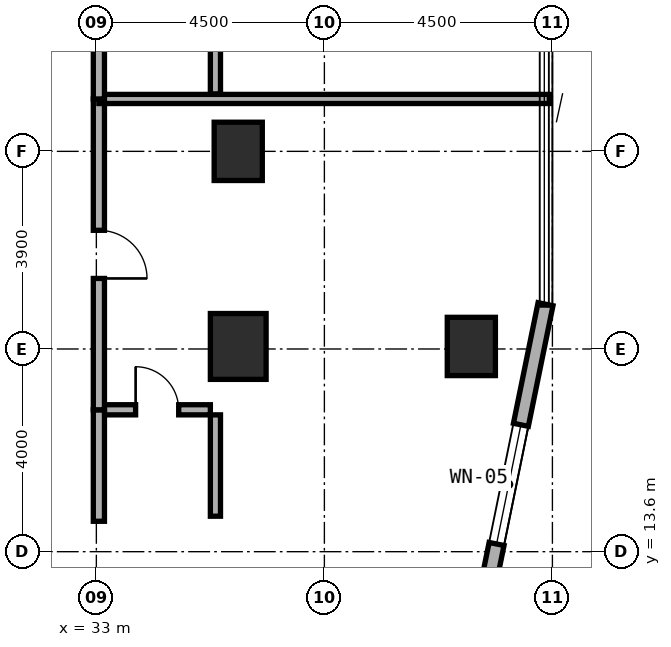
"""IFC4 building model, lengths in metres.
Left out: names, types, materials, properties, quantities, classifications, styles, units other than length and angle.
Written with IfcOpenShell. Run it as: python <this file> out.ifc"""

import sys

from ifc_helpers import new_model, si_unit, direction, frame, frame_2d, origin, origin_2d, place, context, subcontext, project, spatial, rectangle, extrude, element, fill, save


model = new_model("IFC4")
c1 = context("Model", 3, precision=1e-05, world=origin(), true_north=direction((0.0, 1.0)))
c2 = subcontext(c1, "Body", "Model", "MODEL_VIEW")
j1 = project(units=[si_unit("LENGTHUNIT", "METRE"), si_unit("PLANEANGLEUNIT", "RADIAN")], contexts=[c1])
p1 = place(None, origin())
s1 = spatial("IfcSite", under=j1, at=p1, CompositionType="ELEMENT")
p2 = place(p1, origin())
s2 = spatial("IfcBuilding", under=s1, at=p2, CompositionType="ELEMENT")
p3 = place(p2, frame((0.0, 0.0, 31.0)))
s3 = spatial("IfcBuildingStorey", under=s2, at=p3, CompositionType="ELEMENT", Elevation=31.0)
p4 = place(p3, frame((35.8, 21.5, 0.0), z_axis=(0.0, 0.0, 1.0), x_axis=(1.0, 0.0, 0.0)))
e1 = element("IfcColumn", 1, at=p4, inside=s3, PredefinedType="COLUMN", context=c2, shape_type="SweptSolid", body=[
    extrude(rectangle(XDim=0.95, YDim=1.15, at=origin_2d()), origin(), (0.0, 0.0, 1.0), 3.5),
])
p5 = place(p3, frame((35.8, 17.65, 0.0), z_axis=(0.0, 0.0, 1.0), x_axis=(1.0, 0.0, 0.0)))
e2 = element("IfcColumn", 2, at=p5, inside=s3, PredefinedType="COLUMN", context=c2, shape_type="SweptSolid", body=[
    extrude(rectangle(XDim=1.1, YDim=1.3, at=origin_2d()), origin(), (0.0, 0.0, 1.0), 3.5),
])
p6 = place(p3, frame((40.4, 17.65, 0.0), z_axis=(0.0, 0.0, 1.0), x_axis=(1.0, 0.0, 0.0)))
e3 = element("IfcColumn", 3, at=p6, inside=s3, PredefinedType="COLUMN", context=c2, shape_type="SweptSolid", body=[
    extrude(rectangle(XDim=0.95, YDim=1.15, at=origin_2d()), origin(), (0.0, 0.0, 1.0), 3.5),
])
p7 = place(p3, frame((39.851, 8.622, 0.0), z_axis=(0.0, 0.0, 1.0), x_axis=(0.199990901713, 0.979797754249, 0.0)))
e4 = element("IfcWall", 4, at=p7, inside=s3, PredefinedType="STANDARD", context=c2, shape_type="SweptSolid", body=[
    extrude(rectangle(XDim=10.065, YDim=0.3, at=frame_2d((5.033, 0.0))), origin(), (0.0, 0.0, 1.0), 3.22),
])
p8 = place(p7, frame((0.378, 0.0, 0.85)))
e5 = element("IfcOpeningElement", 5, at=p8, cuts=e4, PredefinedType="OPENING", context=c2, shape_type="SweptSolid", body=[
    extrude(rectangle(XDim=1.8, YDim=1.5, at=frame_2d((0.9, 0.75))), frame((0.0, 0.16, 0.0), z_axis=(0.0, -1.0, 0.0), x_axis=(1.0, 0.0, 0.0)), (0.0, 0.0, 1.0), 0.32),
])
p9 = place(p7, frame((5.236, 0.0, 0.8)))
e6 = element("IfcOpeningElement", 6, at=p9, cuts=e4, PredefinedType="OPENING", context=c2, shape_type="SweptSolid", body=[
    extrude(rectangle(XDim=2.4, YDim=1.6, at=frame_2d((1.2, 0.8))), frame((0.0, 0.16, 0.0), z_axis=(0.0, -1.0, 0.0), x_axis=(1.0, 0.0, 0.0)), (0.0, 0.0, 1.0), 0.32),
])
p10 = place(p3, frame((33.15, 16.4, 0.0), z_axis=(0.0, 0.0, 1.0), x_axis=(1.0, 0.0, 0.0)))
e7 = element("IfcWall", 7, at=p10, inside=s3, PredefinedType="PLUMBINGWALL", context=c2, shape_type="SweptSolid", body=[
    extrude(rectangle(XDim=2.1, YDim=0.2, at=frame_2d((1.05, 0.0))), origin(), (0.0, 0.0, 1.0), 3.22),
])
p11 = place(p10, frame((0.625, 0.0, 0.0)))
e8 = element("IfcOpeningElement", 8, at=p11, cuts=e7, PredefinedType="OPENING", context=c2, shape_type="SweptSolid", body=[
    extrude(rectangle(XDim=0.85, YDim=2.1, at=frame_2d((0.425, 1.05))), frame((0.0, 0.11, 0.0), z_axis=(0.0, -1.0, 0.0), x_axis=(1.0, 0.0, 0.0)), (0.0, 0.0, 1.0), 0.22),
])
p12 = place(p3, frame((35.35, 14.3, 0.0), z_axis=(0.0, 0.0, 1.0), x_axis=(0.0, 1.0, 0.0)))
e9 = element("IfcWall", 9, at=p12, inside=s3, PredefinedType="PLUMBINGWALL", context=c2, shape_type="SweptSolid", body=[
    extrude(rectangle(XDim=2.0, YDim=0.2, at=frame_2d((1.0, 0.0))), origin(), (0.0, 0.0, 1.0), 2.745),
])
p13 = place(p3, frame((33.05, 14.2, 0.0), z_axis=(0.0, 0.0, 1.0), x_axis=(0.0, 1.0, 0.0)))
e10 = element("IfcWall", 10, at=p13, inside=s3, PredefinedType="SOLIDWALL", context=c2, shape_type="SweptSolid", body=[
    extrude(rectangle(XDim=2.2, YDim=0.22, at=frame_2d((1.1, 0.0))), origin(), (0.0, 0.0, 1.0), 3.22),
])
p14 = place(p3, frame((33.05, 16.4, 0.0), z_axis=(0.0, 0.0, 1.0), x_axis=(0.0, 1.0, 0.0)))
e11 = element("IfcWall", 11, at=p14, inside=s3, PredefinedType="SOLIDWALL", context=c2, shape_type="SweptSolid", body=[
    extrude(rectangle(XDim=6.134, YDim=0.22, at=frame_2d((3.067, 0.0))), origin(), (0.0, 0.0, 1.0), 2.395),
])
p15 = place(p14, frame((2.592, 0.0, 0.0)))
e12 = element("IfcOpeningElement", 12, at=p15, cuts=e11, PredefinedType="OPENING", context=c2, shape_type="SweptSolid", body=[
    extrude(rectangle(XDim=0.95, YDim=2.1, at=frame_2d((0.475, 1.05))), frame((0.0, 0.12, 0.0), z_axis=(0.0, -1.0, 0.0), x_axis=(1.0, 0.0, 0.0)), (0.0, 0.0, 1.0), 0.24),
])
p16 = place(p3, frame((33.05, 22.534, 0.0), z_axis=(0.0, 0.0, 1.0), x_axis=(1.0, 0.0, 0.0)))
e13 = element("IfcWall", 13, at=p16, inside=s3, PredefinedType="SOLIDWALL", context=c2, shape_type="SweptSolid", body=[
    extrude(rectangle(XDim=8.89, YDim=0.18, at=frame_2d((4.445, 0.0))), origin(), (0.0, 0.0, 1.0), 2.745),
])
p17 = place(p3, frame((35.35, 22.634, 0.0), z_axis=(0.0, 0.0, 1.0), x_axis=(0.0, 1.0, 0.0)))
e14 = element("IfcWall", 14, at=p17, inside=s3, PredefinedType="PLUMBINGWALL", context=c2, shape_type="SweptSolid", body=[
    extrude(rectangle(XDim=2.0, YDim=0.2, at=frame_2d((1.0, 0.0))), origin(), (0.0, 0.0, 1.0), 3.22),
])
p18 = place(p3, frame((33.05, 22.534, 0.0), z_axis=(0.0, 0.0, 1.0), x_axis=(0.0, 1.0, 0.0)))
e15 = element("IfcWall", 15, at=p18, inside=s3, PredefinedType="SOLIDWALL", context=c2, shape_type="SweptSolid", body=[
    extrude(rectangle(XDim=2.2, YDim=0.22, at=frame_2d((1.1, 0.0))), origin(), (0.0, 0.0, 1.0), 3.22),
])
p19 = place(p9, origin())
e16 = element("IfcWindow", 16, at=p19, inside=s3, PartitioningType="SINGLE_PANEL", PredefinedType="WINDOW", context=c2, shape_type="SweptSolid", body=[
    extrude(rectangle(XDim=2.4, YDim=1.6, at=frame_2d((1.2, 0.8))), frame((0.0, 0.03, 0.0), z_axis=(0.0, -1.0, 0.0), x_axis=(1.0, 0.0, 0.0)), (0.0, 0.0, 1.0), 0.06),
])
fill(e6, e16)
p20 = place(p11, origin())
e17 = element("IfcDoor", 17, at=p20, inside=s3, OperationType="SINGLE_SWING_LEFT", PredefinedType="DOOR", context=c2, shape_type="SweptSolid", body=[
    extrude(rectangle(XDim=0.85, YDim=2.1, at=frame_2d((0.425, 1.05))), frame((0.0, 0.025, 0.0), z_axis=(0.0, -1.0, 0.0), x_axis=(1.0, 0.0, 0.0)), (0.0, 0.0, 1.0), 0.05),
])
fill(e8, e17)
p21 = place(p15, frame((0.95, 0.0, 0.0), z_axis=(0.0, 0.0, 1.0), x_axis=(-1.0, 0.0, 0.0)))
e18 = element("IfcDoor", 18, at=p21, inside=s3, OperationType="SINGLE_SWING_RIGHT", PredefinedType="DOOR", context=c2, shape_type="SweptSolid", body=[
    extrude(rectangle(XDim=0.95, YDim=2.1, at=frame_2d((0.475, 1.05))), frame((0.0, 0.025, 0.0), z_axis=(0.0, -1.0, 0.0), x_axis=(1.0, 0.0, 0.0)), (0.0, 0.0, 1.0), 0.05),
])
fill(e12, e18)
save(model, sys.argv[1])
